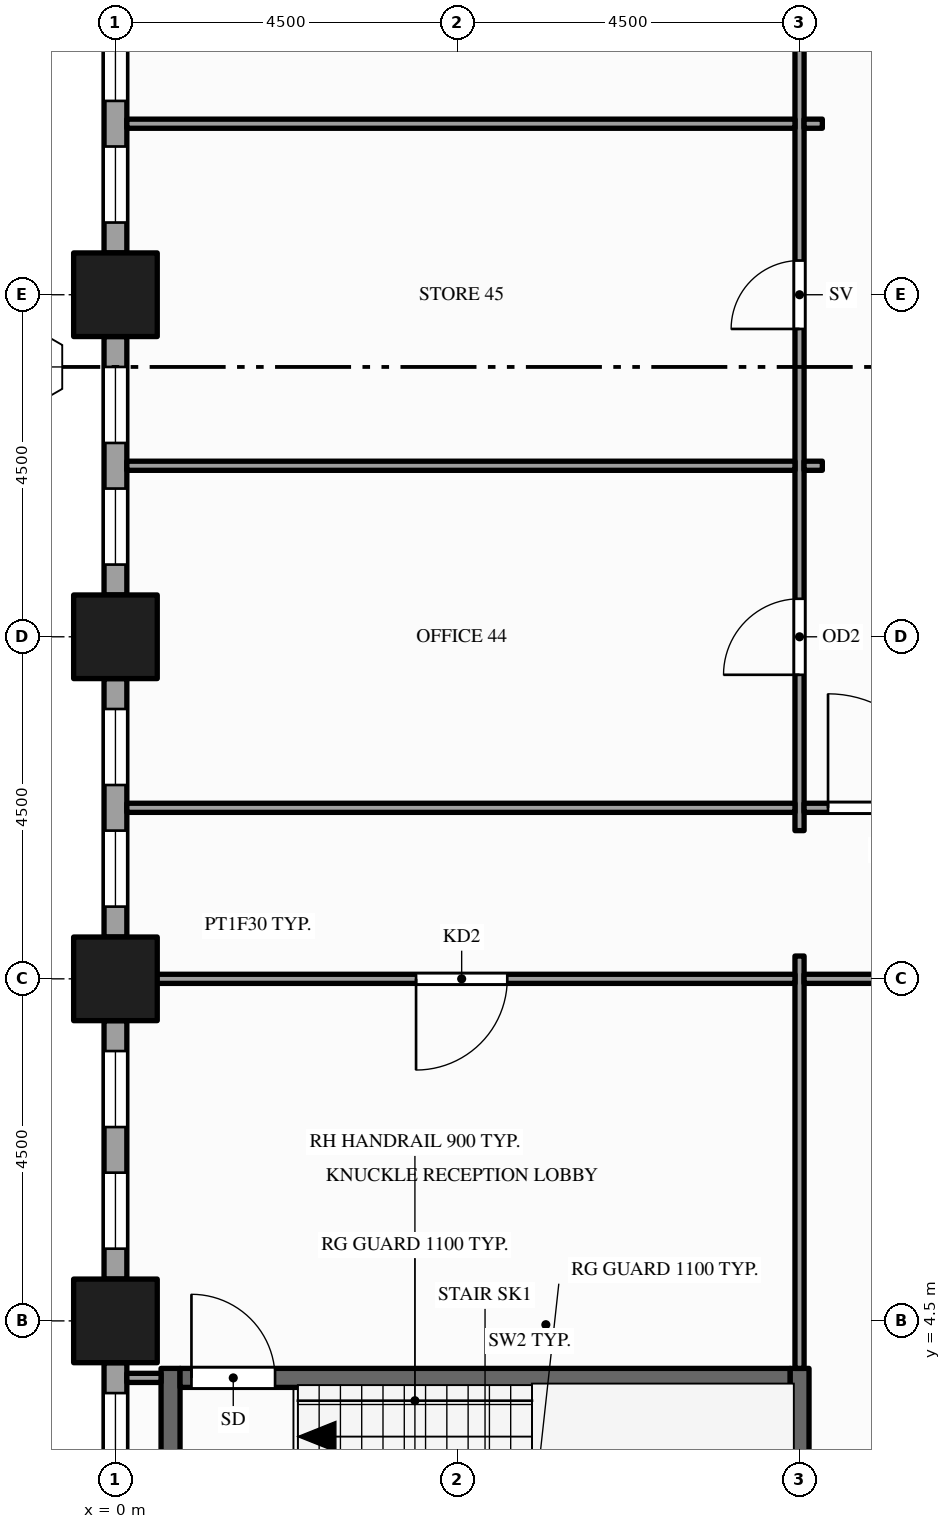
"""IFC4 building model, lengths in metres.
Left out: names, types, materials, properties, quantities, classifications, styles, units other than length and angle.
Written with IfcOpenShell. Run it as: python <this file> out.ifc"""

import sys

from ifc_helpers import new_model, si_unit, direction, frame, frame_2d, origin, origin_2d, place, context, subcontext, project, spatial, rectangle, hollow_rectangle, extrude, element, fill, save


model = new_model("IFC4")
c1 = context("Model", 3, precision=1e-05, world=origin(), true_north=direction((0.0, 1.0)))
c2 = subcontext(c1, "Body", "Model", "MODEL_VIEW")
j1 = project(units=[si_unit("LENGTHUNIT", "METRE"), si_unit("PLANEANGLEUNIT", "RADIAN")], contexts=[c1])
p1 = place(None, origin())
s1 = spatial("IfcSite", under=j1, at=p1, CompositionType="ELEMENT")
p2 = place(p1, origin())
s2 = spatial("IfcBuilding", under=s1, at=p2, CompositionType="ELEMENT")
p3 = place(p2, frame((0.0, 0.0, 33.0)))
s3 = spatial("IfcBuildingStorey", under=s2, at=p3, CompositionType="ELEMENT", Elevation=33.0)
for number, where, z_axis, x_axis in (
    (1, (0.0, 4.5, -0.15), (0.0, 0.0, 1.0), (1.0, 0.0, 0.0)),
    (2, (0.0, 9.0, -0.15), (0.0, 0.0, 1.0), (1.0, 0.0, 0.0)),
    (3, (0.0, 13.5, -0.15), (0.0, 0.0, 1.0), (1.0, 0.0, 0.0)),
    (4, (0.0, 18.0, -0.15), (0.0, 0.0, 1.0), (1.0, 0.0, 0.0)),
):
    element("IfcColumn", number, at=place(p3, frame(where, z_axis=z_axis, x_axis=x_axis)), inside=s3, PredefinedType="COLUMN", context=c2, shape_type="SweptSolid", body=[
        extrude(hollow_rectangle(XDim=1.1, YDim=1.1, WallThickness=0.06, at=origin_2d()), origin(), (0.0, 0.0, 1.0), 4.0),
    ])
p4 = place(p3, frame((0.0, 21.95, 0.0), z_axis=(0.0, 0.0, 1.0), x_axis=(0.0, -1.0, 0.0)))
e5 = element("IfcWall", 5, at=p4, inside=s3, PredefinedType="STANDARD", context=c2, shape_type="SweptSolid", body=[
    extrude(rectangle(XDim=3.4, YDim=0.3, at=frame_2d((1.7, 0.0))), origin(), (0.0, 0.0, 1.0), 3.144),
])
p5 = place(p4, frame((0.4, 0.0, 0.9)))
e6 = element("IfcOpeningElement", 6, at=p5, cuts=e5, PredefinedType="OPENING", context=c2, shape_type="SweptSolid", body=[
    extrude(rectangle(XDim=1.0, YDim=2.0, at=frame_2d((0.5, 1.0))), frame((0.0, 0.16, 0.0), z_axis=(0.0, -1.0, 0.0), x_axis=(1.0, 0.0, 0.0)), (0.0, 0.0, 1.0), 0.32),
])
p6 = place(p4, frame((2.0, 0.0, 0.9)))
e7 = element("IfcOpeningElement", 7, at=p6, cuts=e5, PredefinedType="OPENING", context=c2, shape_type="SweptSolid", body=[
    extrude(rectangle(XDim=1.0, YDim=2.0, at=frame_2d((0.5, 1.0))), frame((0.0, 0.16, 0.0), z_axis=(0.0, -1.0, 0.0), x_axis=(1.0, 0.0, 0.0)), (0.0, 0.0, 1.0), 0.32),
])
p7 = place(p3, frame((0.0, 17.45, 0.0), z_axis=(0.0, 0.0, 1.0), x_axis=(0.0, -1.0, 0.0)))
e8 = element("IfcWall", 8, at=p7, inside=s3, PredefinedType="STANDARD", context=c2, shape_type="SweptSolid", body=[
    extrude(rectangle(XDim=3.4, YDim=0.3, at=frame_2d((1.7, 0.0))), origin(), (0.0, 0.0, 1.0), 3.144),
])
p8 = place(p7, frame((0.4, 0.0, 0.9)))
e9 = element("IfcOpeningElement", 9, at=p8, cuts=e8, PredefinedType="OPENING", context=c2, shape_type="SweptSolid", body=[
    extrude(rectangle(XDim=1.0, YDim=2.0, at=frame_2d((0.5, 1.0))), frame((0.0, 0.16, 0.0), z_axis=(0.0, -1.0, 0.0), x_axis=(1.0, 0.0, 0.0)), (0.0, 0.0, 1.0), 0.32),
])
p9 = place(p7, frame((2.0, 0.0, 0.9)))
e10 = element("IfcOpeningElement", 10, at=p9, cuts=e8, PredefinedType="OPENING", context=c2, shape_type="SweptSolid", body=[
    extrude(rectangle(XDim=1.0, YDim=2.0, at=frame_2d((0.5, 1.0))), frame((0.0, 0.16, 0.0), z_axis=(0.0, -1.0, 0.0), x_axis=(1.0, 0.0, 0.0)), (0.0, 0.0, 1.0), 0.32),
])
p10 = place(p3, frame((0.0, 12.95, 0.0), z_axis=(0.0, 0.0, 1.0), x_axis=(0.0, -1.0, 0.0)))
e11 = element("IfcWall", 11, at=p10, inside=s3, PredefinedType="STANDARD", context=c2, shape_type="SweptSolid", body=[
    extrude(rectangle(XDim=3.4, YDim=0.3, at=frame_2d((1.7, 0.0))), origin(), (0.0, 0.0, 1.0), 3.144),
])
p11 = place(p10, frame((0.4, 0.0, 0.9)))
e12 = element("IfcOpeningElement", 12, at=p11, cuts=e11, PredefinedType="OPENING", context=c2, shape_type="SweptSolid", body=[
    extrude(rectangle(XDim=1.0, YDim=2.0, at=frame_2d((0.5, 1.0))), frame((0.0, 0.16, 0.0), z_axis=(0.0, -1.0, 0.0), x_axis=(1.0, 0.0, 0.0)), (0.0, 0.0, 1.0), 0.32),
])
p12 = place(p10, frame((2.0, 0.0, 0.9)))
e13 = element("IfcOpeningElement", 13, at=p12, cuts=e11, PredefinedType="OPENING", context=c2, shape_type="SweptSolid", body=[
    extrude(rectangle(XDim=1.0, YDim=2.0, at=frame_2d((0.5, 1.0))), frame((0.0, 0.16, 0.0), z_axis=(0.0, -1.0, 0.0), x_axis=(1.0, 0.0, 0.0)), (0.0, 0.0, 1.0), 0.32),
])
p13 = place(p3, frame((0.0, 8.45, 0.0), z_axis=(0.0, 0.0, 1.0), x_axis=(0.0, -1.0, 0.0)))
e14 = element("IfcWall", 14, at=p13, inside=s3, PredefinedType="STANDARD", context=c2, shape_type="SweptSolid", body=[
    extrude(rectangle(XDim=3.4, YDim=0.3, at=frame_2d((1.7, 0.0))), origin(), (0.0, 0.0, 1.0), 3.144),
])
p14 = place(p13, frame((0.4, 0.0, 0.9)))
e15 = element("IfcOpeningElement", 15, at=p14, cuts=e14, PredefinedType="OPENING", context=c2, shape_type="SweptSolid", body=[
    extrude(rectangle(XDim=1.0, YDim=2.0, at=frame_2d((0.5, 1.0))), frame((0.0, 0.16, 0.0), z_axis=(0.0, -1.0, 0.0), x_axis=(1.0, 0.0, 0.0)), (0.0, 0.0, 1.0), 0.32),
])
p15 = place(p13, frame((2.0, 0.0, 0.9)))
e16 = element("IfcOpeningElement", 16, at=p15, cuts=e14, PredefinedType="OPENING", context=c2, shape_type="SweptSolid", body=[
    extrude(rectangle(XDim=1.0, YDim=2.0, at=frame_2d((0.5, 1.0))), frame((0.0, 0.16, 0.0), z_axis=(0.0, -1.0, 0.0), x_axis=(1.0, 0.0, 0.0)), (0.0, 0.0, 1.0), 0.32),
])
p16 = place(p3, frame((0.0, 3.95, 0.0), z_axis=(0.0, 0.0, 1.0), x_axis=(0.0, -1.0, 0.0)))
e17 = element("IfcWall", 17, at=p16, inside=s3, PredefinedType="STANDARD", context=c2, shape_type="SweptSolid", body=[
    extrude(rectangle(XDim=3.4, YDim=0.3, at=frame_2d((1.7, 0.0))), origin(), (0.0, 0.0, 1.0), 3.144),
])
p17 = place(p16, frame((0.4, 0.0, 0.9)))
e18 = element("IfcOpeningElement", 18, at=p17, cuts=e17, PredefinedType="OPENING", context=c2, shape_type="SweptSolid", body=[
    extrude(rectangle(XDim=1.0, YDim=2.0, at=frame_2d((0.5, 1.0))), frame((0.0, 0.16, 0.0), z_axis=(0.0, -1.0, 0.0), x_axis=(1.0, 0.0, 0.0)), (0.0, 0.0, 1.0), 0.32),
])
p18 = place(p16, frame((2.0, 0.0, 0.9)))
e19 = element("IfcOpeningElement", 19, at=p18, cuts=e17, PredefinedType="OPENING", context=c2, shape_type="SweptSolid", body=[
    extrude(rectangle(XDim=1.0, YDim=2.0, at=frame_2d((0.5, 1.0))), frame((0.0, 0.16, 0.0), z_axis=(0.0, -1.0, 0.0), x_axis=(1.0, 0.0, 0.0)), (0.0, 0.0, 1.0), 0.32),
])
p19 = place(p3, frame((0.725, 0.6, 0.0), z_axis=(0.0, 0.0, 1.0), x_axis=(0.0, 1.0, 0.0)))
e20 = element("IfcWall", 20, at=p19, inside=s3, PredefinedType="SHEAR", context=c2, shape_type="SweptSolid", body=[
    extrude(rectangle(XDim=3.275, YDim=0.25, at=frame_2d((1.637, 0.0))), origin(), (0.0, 0.0, 1.0), 3.85),
])
p20 = place(p3, frame((9.0, 0.55, 0.0), z_axis=(0.0, 0.0, 1.0), x_axis=(0.0, 1.0, 0.0)))
e21 = element("IfcWall", 21, at=p20, inside=s3, PredefinedType="SHEAR", context=c2, shape_type="SweptSolid", body=[
    extrude(rectangle(XDim=3.325, YDim=0.25, at=frame_2d((1.663, 0.0))), origin(), (0.0, 0.0, 1.0), 3.85),
])
p21 = place(p3, frame((9.0, 3.875, 0.0), z_axis=(0.0, 0.0, 1.0), x_axis=(0.0, 1.0, 0.0)))
e22 = element("IfcWall", 22, at=p21, inside=s3, PredefinedType="PARTITIONING", context=c2, shape_type="SweptSolid", body=[
    extrude(rectangle(XDim=5.425, YDim=0.12, at=frame_2d((2.712, 0.0))), origin(), (0.0, 0.0, 1.0), 2.938),
])
p22 = place(p3, frame((9.0, 10.95, 0.0), z_axis=(0.0, 0.0, 1.0), x_axis=(0.0, 1.0, 0.0)))
e23 = element("IfcWall", 23, at=p22, inside=s3, PredefinedType="PARTITIONING", context=c2, shape_type="SweptSolid", body=[
    extrude(rectangle(XDim=20.85, YDim=0.12, at=frame_2d((10.425, 0.0))), origin(), (0.0, 0.0, 1.0), 2.6),
])
p23 = place(p22, frame((2.05, 0.0, 0.0)))
e24 = element("IfcOpeningElement", 24, at=p23, cuts=e23, PredefinedType="OPENING", context=c2, shape_type="SweptSolid", body=[
    extrude(rectangle(XDim=1.0, YDim=2.1, at=frame_2d((0.5, 1.05))), frame((0.0, 0.07, 0.0), z_axis=(0.0, -1.0, 0.0), x_axis=(1.0, 0.0, 0.0)), (0.0, 0.0, 1.0), 0.14),
])
p24 = place(p22, frame((6.6, 0.0, 0.0)))
e25 = element("IfcOpeningElement", 25, at=p24, cuts=e23, PredefinedType="OPENING", context=c2, shape_type="SweptSolid", body=[
    extrude(rectangle(XDim=0.9, YDim=2.1, at=frame_2d((0.45, 1.05))), frame((0.0, 0.07, 0.0), z_axis=(0.0, -1.0, 0.0), x_axis=(1.0, 0.0, 0.0)), (0.0, 0.0, 1.0), 0.14),
])
p25 = place(p22, frame((11.805, 0.0, 0.0)))
e26 = element("IfcOpeningElement", 26, at=p25, cuts=e23, PredefinedType="OPENING", context=c2, shape_type="SweptSolid", body=[
    extrude(rectangle(XDim=1.8, YDim=2.1, at=frame_2d((0.9, 1.05))), frame((0.0, 0.07, 0.0), z_axis=(0.0, -1.0, 0.0), x_axis=(1.0, 0.0, 0.0)), (0.0, 0.0, 1.0), 0.14),
])
p26 = place(p3, frame((0.15, 3.75, 0.0), z_axis=(0.0, 0.0, 1.0), x_axis=(1.0, 0.0, 0.0)))
e27 = element("IfcWall", 27, at=p26, inside=s3, PredefinedType="PARTITIONING", context=c2, shape_type="SweptSolid", body=[
    extrude(rectangle(XDim=0.45, YDim=0.12, at=frame_2d((0.225, 0.0))), origin(), (0.0, 0.0, 1.0), 3.144),
])
p27 = place(p3, frame((0.85, 3.75, 0.0), z_axis=(0.0, 0.0, 1.0), x_axis=(1.0, 0.0, 0.0)))
e28 = element("IfcWall", 28, at=p27, inside=s3, PredefinedType="SHEAR", context=c2, shape_type="SweptSolid", body=[
    extrude(rectangle(XDim=8.025, YDim=0.25, at=frame_2d((4.012, 0.0))), origin(), (0.0, 0.0, 1.0), 3.85),
])
p28 = place(p27, frame((0.15, 0.0, 0.0)))
e29 = element("IfcOpeningElement", 29, at=p28, cuts=e28, PredefinedType="OPENING", context=c2, shape_type="SweptSolid", body=[
    extrude(rectangle(XDim=1.1, YDim=2.1, at=frame_2d((0.55, 1.05))), frame((0.0, 0.135, 0.0), z_axis=(0.0, -1.0, 0.0), x_axis=(1.0, 0.0, 0.0)), (0.0, 0.0, 1.0), 0.27),
])
p29 = place(p3, frame((0.15, 9.0, 0.0), z_axis=(0.0, 0.0, 1.0), x_axis=(1.0, 0.0, 0.0)))
e30 = element("IfcWall", 30, at=p29, inside=s3, PredefinedType="PARTITIONING", context=c2, shape_type="SweptSolid", body=[
    extrude(rectangle(XDim=8.79, YDim=0.12, at=frame_2d((4.395, 0.0))), origin(), (0.0, 0.0, 1.0), 2.938),
])
p30 = place(p29, frame((3.805, 0.0, 0.0)))
e31 = element("IfcOpeningElement", 31, at=p30, cuts=e30, PredefinedType="OPENING", context=c2, shape_type="SweptSolid", body=[
    extrude(rectangle(XDim=1.2, YDim=2.1, at=frame_2d((0.6, 1.05))), frame((0.0, 0.07, 0.0), z_axis=(0.0, -1.0, 0.0), x_axis=(1.0, 0.0, 0.0)), (0.0, 0.0, 1.0), 0.14),
])
p31 = place(p3, frame((9.06, 9.0, 0.0), z_axis=(0.0, 0.0, 1.0), x_axis=(1.0, 0.0, 0.0)))
e32 = element("IfcWall", 32, at=p31, inside=s3, PredefinedType="PARTITIONING", context=c2, shape_type="SweptSolid", body=[
    extrude(rectangle(XDim=4.38, YDim=0.12, at=frame_2d((2.19, 0.0))), origin(), (0.0, 0.0, 1.0), 2.938),
])
p32 = place(p31, frame((1.69, 0.0, 0.0)))
e33 = element("IfcOpeningElement", 33, at=p32, cuts=e32, PredefinedType="OPENING", context=c2, shape_type="SweptSolid", body=[
    extrude(rectangle(XDim=1.0, YDim=2.1, at=frame_2d((0.5, 1.05))), frame((0.0, 0.07, 0.0), z_axis=(0.0, -1.0, 0.0), x_axis=(1.0, 0.0, 0.0)), (0.0, 0.0, 1.0), 0.14),
])
p33 = place(p3, frame((0.15, 11.25, 0.0), z_axis=(0.0, 0.0, 1.0), x_axis=(1.0, 0.0, 0.0)))
e34 = element("IfcWall", 34, at=p33, inside=s3, PredefinedType="PARTITIONING", context=c2, shape_type="SweptSolid", body=[
    extrude(rectangle(XDim=8.79, YDim=0.12, at=frame_2d((4.395, 0.0))), origin(), (0.0, 0.0, 1.0), 2.938),
])
p34 = place(p3, frame((9.06, 11.25, 0.0), z_axis=(0.0, 0.0, 1.0), x_axis=(1.0, 0.0, 0.0)))
e35 = element("IfcWall", 35, at=p34, inside=s3, PredefinedType="PARTITIONING", context=c2, shape_type="SweptSolid", body=[
    extrude(rectangle(XDim=2.13, YDim=0.12, at=frame_2d((1.065, 0.0))), origin(), (0.0, 0.0, 1.0), 2.938),
])
p35 = place(p34, frame((0.315, 0.0, 0.0)))
e36 = element("IfcOpeningElement", 36, at=p35, cuts=e35, PredefinedType="OPENING", context=c2, shape_type="SweptSolid", body=[
    extrude(rectangle(XDim=1.5, YDim=2.1, at=frame_2d((0.75, 1.05))), frame((0.0, 0.07, 0.0), z_axis=(0.0, -1.0, 0.0), x_axis=(1.0, 0.0, 0.0)), (0.0, 0.0, 1.0), 0.14),
])
p36 = place(p3, frame((0.15, 15.75, 0.0), z_axis=(0.0, 0.0, 1.0), x_axis=(1.0, 0.0, 0.0)))
e37 = element("IfcWall", 37, at=p36, inside=s3, PredefinedType="PARTITIONING", context=c2, shape_type="SweptSolid", body=[
    extrude(rectangle(XDim=8.79, YDim=0.12, at=frame_2d((4.395, 0.0))), origin(), (0.0, 0.0, 1.0), 2.938),
])
p37 = place(p3, frame((9.06, 15.75, 0.0), z_axis=(0.0, 0.0, 1.0), x_axis=(1.0, 0.0, 0.0)))
e38 = element("IfcWall", 38, at=p37, inside=s3, PredefinedType="PARTITIONING", context=c2, shape_type="SweptSolid", body=[
    extrude(rectangle(XDim=0.24, YDim=0.12, at=frame_2d((0.12, 0.0))), origin(), (0.0, 0.0, 1.0), 2.938),
])
p38 = place(p3, frame((0.15, 20.25, 0.0), z_axis=(0.0, 0.0, 1.0), x_axis=(1.0, 0.0, 0.0)))
e39 = element("IfcWall", 39, at=p38, inside=s3, PredefinedType="PARTITIONING", context=c2, shape_type="SweptSolid", body=[
    extrude(rectangle(XDim=8.79, YDim=0.12, at=frame_2d((4.395, 0.0))), origin(), (0.0, 0.0, 1.0), 2.938),
])
p39 = place(p3, frame((9.06, 20.25, 0.0), z_axis=(0.0, 0.0, 1.0), x_axis=(1.0, 0.0, 0.0)))
e40 = element("IfcWall", 40, at=p39, inside=s3, PredefinedType="PARTITIONING", context=c2, shape_type="SweptSolid", body=[
    extrude(rectangle(XDim=0.24, YDim=0.12, at=frame_2d((0.12, 0.0))), origin(), (0.0, 0.0, 1.0), 2.938),
])
p40 = place(p5, origin())
e41 = element("IfcWindow", 41, at=p40, inside=s3, PartitioningType="SINGLE_PANEL", PredefinedType="WINDOW", context=c2, shape_type="SweptSolid", body=[
    extrude(rectangle(XDim=1.0, YDim=2.0, at=frame_2d((0.5, 1.0))), frame((0.0, 0.03, 0.0), z_axis=(0.0, -1.0, 0.0), x_axis=(1.0, 0.0, 0.0)), (0.0, 0.0, 1.0), 0.06),
])
fill(e6, e41)
p41 = place(p6, origin())
e42 = element("IfcWindow", 42, at=p41, inside=s3, PartitioningType="SINGLE_PANEL", PredefinedType="WINDOW", context=c2, shape_type="SweptSolid", body=[
    extrude(rectangle(XDim=1.0, YDim=2.0, at=frame_2d((0.5, 1.0))), frame((0.0, 0.03, 0.0), z_axis=(0.0, -1.0, 0.0), x_axis=(1.0, 0.0, 0.0)), (0.0, 0.0, 1.0), 0.06),
])
fill(e7, e42)
p42 = place(p8, origin())
e43 = element("IfcWindow", 43, at=p42, inside=s3, PartitioningType="SINGLE_PANEL", PredefinedType="WINDOW", context=c2, shape_type="SweptSolid", body=[
    extrude(rectangle(XDim=1.0, YDim=2.0, at=frame_2d((0.5, 1.0))), frame((0.0, 0.03, 0.0), z_axis=(0.0, -1.0, 0.0), x_axis=(1.0, 0.0, 0.0)), (0.0, 0.0, 1.0), 0.06),
])
fill(e9, e43)
p43 = place(p9, origin())
e44 = element("IfcWindow", 44, at=p43, inside=s3, PartitioningType="SINGLE_PANEL", PredefinedType="WINDOW", context=c2, shape_type="SweptSolid", body=[
    extrude(rectangle(XDim=1.0, YDim=2.0, at=frame_2d((0.5, 1.0))), frame((0.0, 0.03, 0.0), z_axis=(0.0, -1.0, 0.0), x_axis=(1.0, 0.0, 0.0)), (0.0, 0.0, 1.0), 0.06),
])
fill(e10, e44)
p44 = place(p11, origin())
e45 = element("IfcWindow", 45, at=p44, inside=s3, PartitioningType="SINGLE_PANEL", PredefinedType="WINDOW", context=c2, shape_type="SweptSolid", body=[
    extrude(rectangle(XDim=1.0, YDim=2.0, at=frame_2d((0.5, 1.0))), frame((0.0, 0.03, 0.0), z_axis=(0.0, -1.0, 0.0), x_axis=(1.0, 0.0, 0.0)), (0.0, 0.0, 1.0), 0.06),
])
fill(e12, e45)
p45 = place(p12, origin())
e46 = element("IfcWindow", 46, at=p45, inside=s3, PartitioningType="SINGLE_PANEL", PredefinedType="WINDOW", context=c2, shape_type="SweptSolid", body=[
    extrude(rectangle(XDim=1.0, YDim=2.0, at=frame_2d((0.5, 1.0))), frame((0.0, 0.03, 0.0), z_axis=(0.0, -1.0, 0.0), x_axis=(1.0, 0.0, 0.0)), (0.0, 0.0, 1.0), 0.06),
])
fill(e13, e46)
p46 = place(p14, origin())
e47 = element("IfcWindow", 47, at=p46, inside=s3, PartitioningType="SINGLE_PANEL", PredefinedType="WINDOW", context=c2, shape_type="SweptSolid", body=[
    extrude(rectangle(XDim=1.0, YDim=2.0, at=frame_2d((0.5, 1.0))), frame((0.0, 0.03, 0.0), z_axis=(0.0, -1.0, 0.0), x_axis=(1.0, 0.0, 0.0)), (0.0, 0.0, 1.0), 0.06),
])
fill(e15, e47)
p47 = place(p15, origin())
e48 = element("IfcWindow", 48, at=p47, inside=s3, PartitioningType="SINGLE_PANEL", PredefinedType="WINDOW", context=c2, shape_type="SweptSolid", body=[
    extrude(rectangle(XDim=1.0, YDim=2.0, at=frame_2d((0.5, 1.0))), frame((0.0, 0.03, 0.0), z_axis=(0.0, -1.0, 0.0), x_axis=(1.0, 0.0, 0.0)), (0.0, 0.0, 1.0), 0.06),
])
fill(e16, e48)
p48 = place(p17, origin())
e49 = element("IfcWindow", 49, at=p48, inside=s3, PartitioningType="SINGLE_PANEL", PredefinedType="WINDOW", context=c2, shape_type="SweptSolid", body=[
    extrude(rectangle(XDim=1.0, YDim=2.0, at=frame_2d((0.5, 1.0))), frame((0.0, 0.03, 0.0), z_axis=(0.0, -1.0, 0.0), x_axis=(1.0, 0.0, 0.0)), (0.0, 0.0, 1.0), 0.06),
])
fill(e18, e49)
p49 = place(p28, origin())
e50 = element("IfcDoor", 50, at=p49, inside=s3, OperationType="SINGLE_SWING_LEFT", PredefinedType="DOOR", context=c2, shape_type="SweptSolid", body=[
    extrude(rectangle(XDim=1.1, YDim=2.1, at=frame_2d((0.55, 1.05))), frame((0.0, 0.025, 0.0), z_axis=(0.0, -1.0, 0.0), x_axis=(1.0, 0.0, 0.0)), (0.0, 0.0, 1.0), 0.05),
])
fill(e29, e50)
p50 = place(p30, origin())
e51 = element("IfcDoor", 51, at=p50, inside=s3, OperationType="SINGLE_SWING_LEFT", PredefinedType="DOOR", context=c2, shape_type="SweptSolid", body=[
    extrude(rectangle(XDim=1.2, YDim=2.1, at=frame_2d((0.6, 1.05))), frame((0.0, 0.025, 0.0), z_axis=(0.0, -1.0, 0.0), x_axis=(1.0, 0.0, 0.0)), (0.0, 0.0, 1.0), 0.05),
])
fill(e31, e51)
p51 = place(p35, origin())
e52 = element("IfcDoor", 52, at=p51, inside=s3, OperationType="SINGLE_SWING_LEFT", PredefinedType="DOOR", context=c2, shape_type="SweptSolid", body=[
    extrude(rectangle(XDim=1.5, YDim=2.1, at=frame_2d((0.75, 1.05))), frame((0.0, 0.025, 0.0), z_axis=(0.0, -1.0, 0.0), x_axis=(1.0, 0.0, 0.0)), (0.0, 0.0, 1.0), 0.05),
])
fill(e36, e52)
p52 = place(p23, origin())
e53 = element("IfcDoor", 53, at=p52, inside=s3, OperationType="SINGLE_SWING_LEFT", PredefinedType="DOOR", context=c2, shape_type="SweptSolid", body=[
    extrude(rectangle(XDim=1.0, YDim=2.1, at=frame_2d((0.5, 1.05))), frame((0.0, 0.025, 0.0), z_axis=(0.0, -1.0, 0.0), x_axis=(1.0, 0.0, 0.0)), (0.0, 0.0, 1.0), 0.05),
])
fill(e24, e53)
p53 = place(p24, origin())
e54 = element("IfcDoor", 54, at=p53, inside=s3, OperationType="SINGLE_SWING_LEFT", PredefinedType="DOOR", context=c2, shape_type="SweptSolid", body=[
    extrude(rectangle(XDim=0.9, YDim=2.1, at=frame_2d((0.45, 1.05))), frame((0.0, 0.025, 0.0), z_axis=(0.0, -1.0, 0.0), x_axis=(1.0, 0.0, 0.0)), (0.0, 0.0, 1.0), 0.05),
])
fill(e25, e54)
save(model, sys.argv[1])
